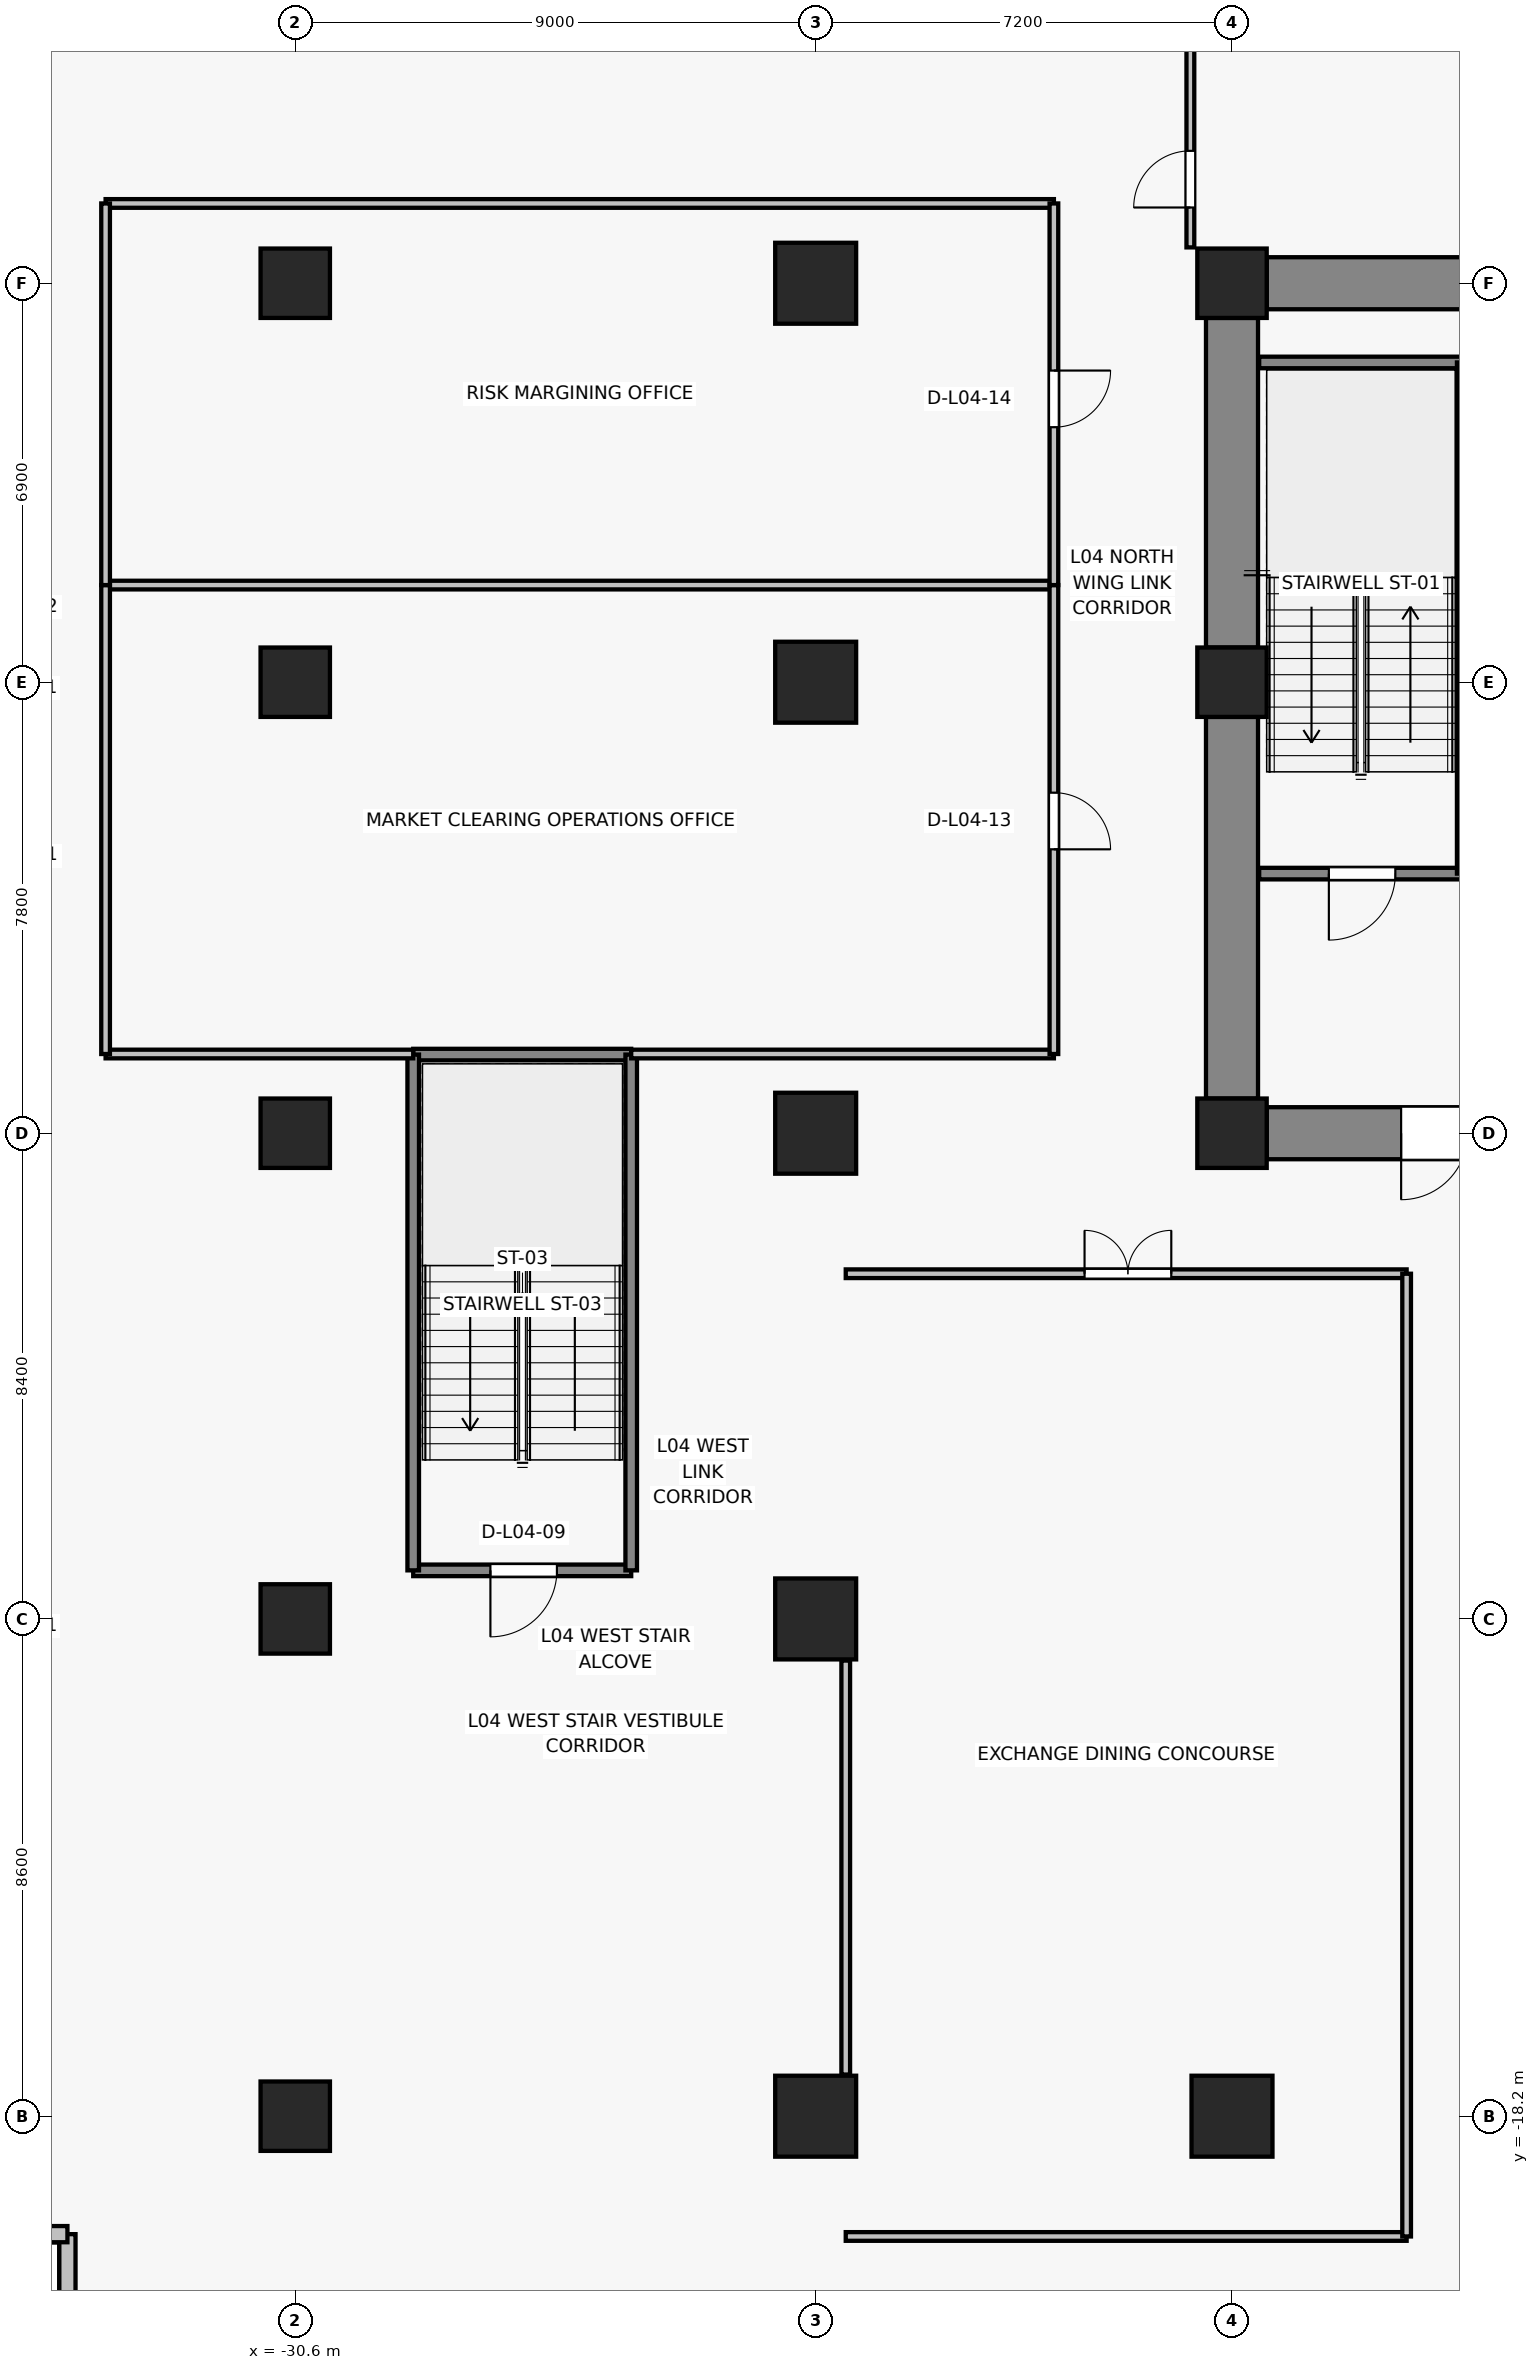
"""IFC4 building model, lengths in metres.
Left out: names, types, materials, properties, quantities, classifications, styles, units other than length and angle.
Written with IfcOpenShell. Run it as: python <this file> out.ifc"""

import sys

from ifc_helpers import new_model, si_unit, direction, frame, frame_2d, origin, origin_2d, place, context, subcontext, project, spatial, rectangle, extrude, source, transform, mapped, element, fill, save


model = new_model("IFC4")
c1 = context("Model", 3, precision=1e-05, world=origin(), true_north=direction((0.0, 1.0)))
c2 = subcontext(c1, "Body", "Model", "MODEL_VIEW")
j1 = project(units=[si_unit("LENGTHUNIT", "METRE"), si_unit("PLANEANGLEUNIT", "RADIAN")], contexts=[c1])
p1 = place(None, origin())
s1 = spatial("IfcSite", under=j1, at=p1, CompositionType="ELEMENT")
p2 = place(p1, origin())
s2 = spatial("IfcBuilding", under=s1, at=p2, CompositionType="ELEMENT")
p3 = place(p2, frame((0.0, 0.0, 18.2)))
s3 = spatial("IfcBuildingStorey", under=s2, at=p3, CompositionType="ELEMENT", Elevation=18.2)
for number, where, z_axis, x_axis in (
    (1, (-14.4, -1.2, 0.0), (0.0, 0.0, 1.0), (1.0, 0.0, 0.0)),
    (2, (-14.4, 6.6, 0.0), (0.0, 0.0, 1.0), (1.0, 0.0, 0.0)),
    (3, (-14.4, 13.5, 0.0), (0.0, 0.0, 1.0), (1.0, 0.0, 0.0)),
):
    element("IfcColumn", number, at=place(p3, frame(where, z_axis=z_axis, x_axis=x_axis)), inside=s3, PredefinedType="COLUMN", context=c2, shape_type="SweptSolid", body=[
        extrude(rectangle(XDim=1.2, YDim=1.2, at=origin_2d()), origin(), (0.0, 0.0, 1.0), 4.4),
    ])
for number, where, z_axis, x_axis in (
    (4, (-21.6, -18.2, 0.0), (0.0, 0.0, 1.0), (1.0, 0.0, 0.0)),
    (5, (-14.4, -18.2, 0.0), (0.0, 0.0, 1.0), (1.0, 0.0, 0.0)),
    (6, (-21.6, -9.6, 0.0), (0.0, 0.0, 1.0), (1.0, 0.0, 0.0)),
    (7, (-21.6, -1.2, 0.0), (0.0, 0.0, 1.0), (1.0, 0.0, 0.0)),
    (8, (-21.6, 6.6, 0.0), (0.0, 0.0, 1.0), (1.0, 0.0, 0.0)),
    (9, (-21.6, 13.5, 0.0), (0.0, 0.0, 1.0), (1.0, 0.0, 0.0)),
):
    element("IfcColumn", number, at=place(p3, frame(where, z_axis=z_axis, x_axis=x_axis)), inside=s3, PredefinedType="COLUMN", context=c2, shape_type="SweptSolid", body=[
        extrude(rectangle(XDim=1.4, YDim=1.4, at=origin_2d()), origin(), (0.0, 0.0, 1.0), 4.4),
    ])
for number, where, z_axis, x_axis in (
    (10, (-30.6, -18.2, 0.0), (0.0, 0.0, 1.0), (1.0, 0.0, 0.0)),
    (11, (-30.6, -9.6, 0.0), (0.0, 0.0, 1.0), (1.0, 0.0, 0.0)),
    (12, (-30.6, -1.2, 0.0), (0.0, 0.0, 1.0), (1.0, 0.0, 0.0)),
    (13, (-30.6, 6.6, 0.0), (0.0, 0.0, 1.0), (1.0, 0.0, 0.0)),
    (14, (-30.6, 13.5, 0.0), (0.0, 0.0, 1.0), (1.0, 0.0, 0.0)),
):
    element("IfcColumn", number, at=place(p3, frame(where, z_axis=z_axis, x_axis=x_axis)), inside=s3, PredefinedType="COLUMN", context=c2, shape_type="SweptSolid", body=[
        extrude(rectangle(XDim=1.2, YDim=1.2, at=origin_2d()), origin(), (0.0, 0.0, 1.0), 4.4),
    ])
p4 = place(p3, frame((-13.8, 13.5, 0.0), z_axis=(0.0, 0.0, 1.0), x_axis=(1.0, 0.0, 0.0)))
e15 = element("IfcWall", 15, at=p4, inside=s3, PredefinedType="SHEAR", context=c2, shape_type="SweptSolid", body=[
    extrude(rectangle(XDim=6.0, YDim=0.9, at=frame_2d((3.0, 0.0))), origin(), (0.0, 0.0, 1.0), 4.1),
])
p5 = place(p3, frame((-14.4, -0.6, 0.0), z_axis=(0.0, 0.0, 1.0), x_axis=(0.0, 1.0, 0.0)))
e16 = element("IfcWall", 16, at=p5, inside=s3, PredefinedType="SHEAR", context=c2, shape_type="SweptSolid", body=[
    extrude(rectangle(XDim=6.6, YDim=0.9, at=frame_2d((3.3, 0.0))), origin(), (0.0, 0.0, 1.0), 4.1),
])
p6 = place(p3, frame((-14.4, 7.2, 0.0), z_axis=(0.0, 0.0, 1.0), x_axis=(0.0, 1.0, 0.0)))
e17 = element("IfcWall", 17, at=p6, inside=s3, PredefinedType="SHEAR", context=c2, shape_type="SweptSolid", body=[
    extrude(rectangle(XDim=5.7, YDim=0.9, at=frame_2d((2.85, 0.0))), origin(), (0.0, 0.0, 1.0), 4.1),
])
p7 = place(p3, frame((-7.8, -1.2, 0.0), z_axis=(0.0, 0.0, 1.0), x_axis=(-1.0, 0.0, 0.0)))
e18 = element("IfcWall", 18, at=p7, inside=s3, PredefinedType="SHEAR", context=c2, shape_type="SweptSolid", body=[
    extrude(rectangle(XDim=6.0, YDim=0.9, at=frame_2d((3.0, 0.0))), origin(), (0.0, 0.0, 1.0), 4.1),
])
p8 = place(p7, frame((2.525, 0.0, 0.0)))
e19 = element("IfcOpeningElement", 19, at=p8, cuts=e18, PredefinedType="OPENING", context=c2, shape_type="SweptSolid", body=[
    extrude(rectangle(XDim=1.15, YDim=2.15, at=frame_2d((0.575, 1.075))), frame((0.0, 0.46, 0.0), z_axis=(0.0, -1.0, 0.0), x_axis=(1.0, 0.0, 0.0)), (0.0, 0.0, 1.0), 0.92),
])
for number, where, z_axis, x_axis in (
    (20, (-34.54, -20.24, 0.0), (0.0, 0.0, 1.0), (0.0, -1.0, 0.0)),
    (21, (-36.04, -20.24, 0.0), (0.0, 0.0, 1.0), (1.0, 0.0, 0.0)),
):
    element("IfcWall", number, at=place(p3, frame(where, z_axis=z_axis, x_axis=x_axis)), inside=s3, PredefinedType="SOLIDWALL", context=c2, shape_type="SweptSolid", body=[
        extrude(rectangle(XDim=1.5, YDim=0.28, at=frame_2d((0.75, 0.0))), origin(), (0.0, 0.0, 1.0), 4.1),
    ])
p9 = place(p3, frame((-10.41, 3.29, 0.0), z_axis=(0.0, 0.0, 1.0), x_axis=(-1.0, 0.0, 0.0)))
e22 = element("IfcWall", 22, at=p9, inside=s3, PredefinedType="SOLIDWALL", context=c2, shape_type="SweptSolid", body=[
    extrude(rectangle(XDim=3.52, YDim=0.2, at=frame_2d((1.76, 0.0))), origin(), (0.0, 0.0, 1.0), 4.1),
])
p10 = place(p9, frame((1.165, 0.0, 0.0)))
e23 = element("IfcOpeningElement", 23, at=p10, cuts=e22, PredefinedType="OPENING", context=c2, shape_type="SweptSolid", body=[
    extrude(rectangle(XDim=1.15, YDim=2.15, at=frame_2d((0.575, 1.075))), frame((0.0, 0.11, 0.0), z_axis=(0.0, -1.0, 0.0), x_axis=(1.0, 0.0, 0.0)), (0.0, 0.0, 1.0), 0.22),
])
p11 = place(p3, frame((-13.93, 12.13, 0.0), z_axis=(0.0, 0.0, 1.0), x_axis=(1.0, 0.0, 0.0)))
e24 = element("IfcWall", 24, at=p11, inside=s3, PredefinedType="SOLIDWALL", context=c2, shape_type="SweptSolid", body=[
    extrude(rectangle(XDim=3.52, YDim=0.2, at=frame_2d((1.76, 0.0))), origin(), (0.0, 0.0, 1.0), 4.1),
])
p12 = place(p3, frame((-10.41, 12.13, 0.0), z_axis=(0.0, 0.0, 1.0), x_axis=(0.0, -1.0, 0.0)))
e25 = element("IfcWall", 25, at=p12, inside=s3, PredefinedType="SOLIDWALL", context=c2, shape_type="SweptSolid", body=[
    extrude(rectangle(XDim=8.84, YDim=0.2, at=frame_2d((4.42, 0.0))), origin(), (0.0, 0.0, 1.0), 4.1),
])
p13 = place(p3, frame((-24.79, -8.76, 0.0), z_axis=(0.0, 0.0, 1.0), x_axis=(-1.0, 0.0, 0.0)))
e26 = element("IfcWall", 26, at=p13, inside=s3, PredefinedType="SOLIDWALL", context=c2, shape_type="SweptSolid", body=[
    extrude(rectangle(XDim=3.77, YDim=0.2, at=frame_2d((1.885, 0.0))), origin(), (0.0, 0.0, 1.0), 4.1),
])
p14 = place(p13, frame((1.285, 0.0, 0.0)))
e27 = element("IfcOpeningElement", 27, at=p14, cuts=e26, PredefinedType="OPENING", context=c2, shape_type="SweptSolid", body=[
    extrude(rectangle(XDim=1.15, YDim=2.15, at=frame_2d((0.575, 1.075))), frame((0.0, 0.11, 0.0), z_axis=(0.0, -1.0, 0.0), x_axis=(1.0, 0.0, 0.0)), (0.0, 0.0, 1.0), 0.22),
])
p15 = place(p3, frame((-28.56, 0.16, 0.0), z_axis=(0.0, 0.0, 1.0), x_axis=(1.0, 0.0, 0.0)))
e28 = element("IfcWall", 28, at=p15, inside=s3, PredefinedType="SOLIDWALL", context=c2, shape_type="SweptSolid", body=[
    extrude(rectangle(XDim=3.77, YDim=0.2, at=frame_2d((1.885, 0.0))), origin(), (0.0, 0.0, 1.0), 4.1),
])
for number, where, z_axis, x_axis in (
    (29, (-28.56, -8.76, 0.0), (0.0, 0.0, 1.0), (0.0, 1.0, 0.0)),
    (30, (-24.79, 0.16, 0.0), (0.0, 0.0, 1.0), (0.0, -1.0, 0.0)),
):
    element("IfcWall", number, at=place(p3, frame(where, z_axis=z_axis, x_axis=x_axis)), inside=s3, PredefinedType="SOLIDWALL", context=c2, shape_type="SweptSolid", body=[
        extrude(rectangle(XDim=8.92, YDim=0.2, at=frame_2d((4.46, 0.0))), origin(), (0.0, 0.0, 1.0), 4.1),
    ])
p16 = place(p3, frame((-11.38, -20.28, 0.0), z_axis=(0.0, 0.0, 1.0), x_axis=(-1.0, 0.0, 0.0)))
e31 = element("IfcWall", 31, at=p16, inside=s3, PredefinedType="PARTITIONING", context=c2, shape_type="SweptSolid", body=[
    extrude(rectangle(XDim=9.7, YDim=0.15, at=frame_2d((4.85, 0.0))), origin(), (0.0, 0.0, 1.0), 4.1),
])
p17 = place(p3, frame((-21.08, -3.63, 0.0), z_axis=(0.0, 0.0, 1.0), x_axis=(1.0, 0.0, 0.0)))
e32 = element("IfcWall", 32, at=p17, inside=s3, PredefinedType="PARTITIONING", context=c2, shape_type="SweptSolid", body=[
    extrude(rectangle(XDim=9.7, YDim=0.15, at=frame_2d((4.85, 0.0))), origin(), (0.0, 0.0, 1.0), 3.239),
])
p18 = place(p17, frame((4.13, 0.0, 0.0)))
e33 = element("IfcOpeningElement", 33, at=p18, cuts=e32, PredefinedType="OPENING", context=c2, shape_type="SweptSolid", body=[
    extrude(rectangle(XDim=1.5, YDim=2.2, at=frame_2d((0.75, 1.1))), frame((0.0, 0.085, 0.0), z_axis=(0.0, -1.0, 0.0), x_axis=(1.0, 0.0, 0.0)), (0.0, 0.0, 1.0), 0.17),
])
p19 = place(p3, frame((-21.08, -17.48, 0.0), z_axis=(0.0, 0.0, 1.0), x_axis=(0.0, 1.0, 0.0)))
e34 = element("IfcWall", 34, at=p19, inside=s3, PredefinedType="PARTITIONING", context=c2, shape_type="SweptSolid", body=[
    extrude(rectangle(XDim=7.16, YDim=0.15, at=frame_2d((3.58, 0.0))), origin(), (0.0, 0.0, 1.0), 3.29),
])
p20 = place(p3, frame((-11.38, -3.63, 0.0), z_axis=(0.0, 0.0, 1.0), x_axis=(0.0, -1.0, 0.0)))
e35 = element("IfcWall", 35, at=p20, inside=s3, PredefinedType="PARTITIONING", context=c2, shape_type="SweptSolid", body=[
    extrude(rectangle(XDim=16.65, YDim=0.15, at=frame_2d((8.325, 0.0))), origin(), (0.0, 0.0, 1.0), 3.19),
])
p21 = place(p3, frame((-28.56, 0.17, 0.0), z_axis=(0.0, 0.0, 1.0), x_axis=(-1.0, 0.0, 0.0)))
e36 = element("IfcWall", 36, at=p21, inside=s3, PredefinedType="PARTITIONING", context=c2, shape_type="SweptSolid", body=[
    extrude(rectangle(XDim=5.32, YDim=0.15, at=frame_2d((2.66, 0.0))), origin(), (0.0, 0.0, 1.0), 3.19),
])
p22 = place(p3, frame((-17.48, 0.17, 0.0), z_axis=(0.0, 0.0, 1.0), x_axis=(-1.0, 0.0, 0.0)))
e37 = element("IfcWall", 37, at=p22, inside=s3, PredefinedType="PARTITIONING", context=c2, shape_type="SweptSolid", body=[
    extrude(rectangle(XDim=7.31, YDim=0.15, at=frame_2d((3.655, 0.0))), origin(), (0.0, 0.0, 1.0), 3.19),
])
p23 = place(p3, frame((-33.88, 8.28, 0.0), z_axis=(0.0, 0.0, 1.0), x_axis=(1.0, 0.0, 0.0)))
e38 = element("IfcWall", 38, at=p23, inside=s3, PredefinedType="PARTITIONING", context=c2, shape_type="SweptSolid", body=[
    extrude(rectangle(XDim=16.4, YDim=0.15, at=frame_2d((8.2, 0.0))), origin(), (0.0, 0.0, 1.0), 3.19),
])
p24 = place(p3, frame((-33.88, 0.17, 0.0), z_axis=(0.0, 0.0, 1.0), x_axis=(0.0, 1.0, 0.0)))
e39 = element("IfcWall", 39, at=p24, inside=s3, PredefinedType="PARTITIONING", context=c2, shape_type="SweptSolid", body=[
    extrude(rectangle(XDim=8.11, YDim=0.15, at=frame_2d((4.055, 0.0))), origin(), (0.0, 0.0, 1.0), 4.1),
])
p25 = place(p3, frame((-17.48, 8.28, 0.0), z_axis=(0.0, 0.0, 1.0), x_axis=(0.0, -1.0, 0.0)))
e40 = element("IfcWall", 40, at=p25, inside=s3, PredefinedType="PARTITIONING", context=c2, shape_type="SweptSolid", body=[
    extrude(rectangle(XDim=8.11, YDim=0.15, at=frame_2d((4.055, 0.0))), origin(), (0.0, 0.0, 1.0), 3.19),
])
p26 = place(p25, frame((3.59, 0.0, 0.0)))
e41 = element("IfcOpeningElement", 41, at=p26, cuts=e40, PredefinedType="OPENING", context=c2, shape_type="SweptSolid", body=[
    extrude(rectangle(XDim=0.98, YDim=2.15, at=frame_2d((0.49, 1.075))), frame((0.0, 0.085, 0.0), z_axis=(0.0, -1.0, 0.0), x_axis=(1.0, 0.0, 0.0)), (0.0, 0.0, 1.0), 0.17),
])
p27 = place(p3, frame((-33.88, 14.88, 0.0), z_axis=(0.0, 0.0, 1.0), x_axis=(1.0, 0.0, 0.0)))
e42 = element("IfcWall", 42, at=p27, inside=s3, PredefinedType="PARTITIONING", context=c2, shape_type="SweptSolid", body=[
    extrude(rectangle(XDim=16.4, YDim=0.15, at=frame_2d((8.2, 0.0))), origin(), (0.0, 0.0, 1.0), 3.19),
])
p28 = place(p3, frame((-33.88, 8.28, 0.0), z_axis=(0.0, 0.0, 1.0), x_axis=(0.0, 1.0, 0.0)))
e43 = element("IfcWall", 43, at=p28, inside=s3, PredefinedType="PARTITIONING", context=c2, shape_type="SweptSolid", body=[
    extrude(rectangle(XDim=6.6, YDim=0.15, at=frame_2d((3.3, 0.0))), origin(), (0.0, 0.0, 1.0), 4.1),
])
p29 = place(p3, frame((-17.48, 14.88, 0.0), z_axis=(0.0, 0.0, 1.0), x_axis=(0.0, -1.0, 0.0)))
e44 = element("IfcWall", 44, at=p29, inside=s3, PredefinedType="PARTITIONING", context=c2, shape_type="SweptSolid", body=[
    extrude(rectangle(XDim=6.6, YDim=0.15, at=frame_2d((3.3, 0.0))), origin(), (0.0, 0.0, 1.0), 3.19),
])
p30 = place(p29, frame((2.89, 0.0, 0.0)))
e45 = element("IfcOpeningElement", 45, at=p30, cuts=e44, PredefinedType="OPENING", context=c2, shape_type="SweptSolid", body=[
    extrude(rectangle(XDim=0.98, YDim=2.15, at=frame_2d((0.49, 1.075))), frame((0.0, 0.085, 0.0), z_axis=(0.0, -1.0, 0.0), x_axis=(1.0, 0.0, 0.0)), (0.0, 0.0, 1.0), 0.17),
])
p31 = place(p3, frame((-15.12, 14.12, 0.0), z_axis=(0.0, 0.0, 1.0), x_axis=(0.0, 1.0, 0.0)))
e46 = element("IfcWall", 46, at=p31, inside=s3, PredefinedType="PARTITIONING", context=c2, shape_type="SweptSolid", body=[
    extrude(rectangle(XDim=6.96, YDim=0.135, at=frame_2d((3.48, 0.0))), origin(), (0.0, 0.0, 1.0), 3.473),
])
p32 = place(p31, frame((0.69, 0.0, 0.0)))
e47 = element("IfcOpeningElement", 47, at=p32, cuts=e46, PredefinedType="OPENING", context=c2, shape_type="SweptSolid", body=[
    extrude(rectangle(XDim=0.98, YDim=2.15, at=frame_2d((0.49, 1.075))), frame((0.0, 0.077, 0.0), z_axis=(0.0, -1.0, 0.0), x_axis=(1.0, 0.0, 0.0)), (0.0, 0.0, 1.0), 0.155),
])
m1 = source(origin(), c2, "Body", "SweptSolid", [
    extrude(rectangle(XDim=1.15, YDim=2.15, at=frame_2d((0.575, 1.075))), frame((0.0, 0.025, 0.0), z_axis=(0.0, -1.0, 0.0), x_axis=(1.0, 0.0, 0.0)), (0.0, 0.0, 1.0), 0.05),
])
p33 = place(p10, origin())
e48 = element("IfcDoor", 48, at=p33, inside=s3, OperationType="SINGLE_SWING_RIGHT", PredefinedType="DOOR", context=c2, shape_type="MappedRepresentation", body=[
    mapped(m1, transform((0.0, 0.0, 0.0), x_axis=(1.0, 0.0, 0.0), y_axis=(0.0, 1.0, 0.0), z_axis=(0.0, 0.0, 1.0), scale=1.0)),
])
fill(e23, e48)
p34 = place(p8, origin())
e49 = element("IfcDoor", 49, at=p34, inside=s3, OperationType="SINGLE_SWING_RIGHT", PredefinedType="DOOR", context=c2, shape_type="MappedRepresentation", body=[
    mapped(m1, transform((0.0, 0.0, 0.0), x_axis=(1.0, 0.0, 0.0), y_axis=(0.0, 1.0, 0.0), z_axis=(0.0, 0.0, 1.0), scale=1.0)),
])
fill(e19, e49)
p35 = place(p14, origin())
e50 = element("IfcDoor", 50, at=p35, inside=s3, OperationType="SINGLE_SWING_RIGHT", PredefinedType="DOOR", context=c2, shape_type="MappedRepresentation", body=[
    mapped(m1, transform((0.0, 0.0, 0.0), x_axis=(1.0, 0.0, 0.0), y_axis=(0.0, 1.0, 0.0), z_axis=(0.0, 0.0, 1.0), scale=1.0)),
])
fill(e27, e50)
m2 = source(origin(), c2, "Body", "SweptSolid", [
    extrude(rectangle(XDim=1.5, YDim=2.2, at=frame_2d((0.75, 1.1))), frame((0.0, 0.025, 0.0), z_axis=(0.0, -1.0, 0.0), x_axis=(1.0, 0.0, 0.0)), (0.0, 0.0, 1.0), 0.05),
])
p36 = place(p18, origin())
e51 = element("IfcDoor", 51, at=p36, inside=s3, OperationType="DOUBLE_DOOR_SINGLE_SWING", PredefinedType="DOOR", context=c2, shape_type="MappedRepresentation", body=[
    mapped(m2, transform((0.0, 0.0, 0.0), x_axis=(1.0, 0.0, 0.0), y_axis=(0.0, 1.0, 0.0), z_axis=(0.0, 0.0, 1.0), scale=1.0)),
])
fill(e33, e51)
m3 = source(origin(), c2, "Body", "SweptSolid", [
    extrude(rectangle(XDim=0.98, YDim=2.15, at=frame_2d((0.49, 1.075))), frame((0.0, 0.025, 0.0), z_axis=(0.0, -1.0, 0.0), x_axis=(1.0, 0.0, 0.0)), (0.0, 0.0, 1.0), 0.05),
])
p37 = place(p26, origin())
e52 = element("IfcDoor", 52, at=p37, inside=s3, OperationType="SINGLE_SWING_RIGHT", PredefinedType="DOOR", context=c2, shape_type="MappedRepresentation", body=[
    mapped(m3, transform((0.0, 0.0, 0.0), x_axis=(1.0, 0.0, 0.0), y_axis=(0.0, 1.0, 0.0), z_axis=(0.0, 0.0, 1.0), scale=1.0)),
])
fill(e41, e52)
p38 = place(p30, origin())
e53 = element("IfcDoor", 53, at=p38, inside=s3, OperationType="SINGLE_SWING_LEFT", PredefinedType="DOOR", context=c2, shape_type="MappedRepresentation", body=[
    mapped(m3, transform((0.0, 0.0, 0.0), x_axis=(1.0, 0.0, 0.0), y_axis=(0.0, 1.0, 0.0), z_axis=(0.0, 0.0, 1.0), scale=1.0)),
])
fill(e45, e53)
p39 = place(p32, origin())
e54 = element("IfcDoor", 54, at=p39, inside=s3, OperationType="SINGLE_SWING_LEFT", PredefinedType="DOOR", context=c2, shape_type="MappedRepresentation", body=[
    mapped(m3, transform((0.0, 0.0, 0.0), x_axis=(1.0, 0.0, 0.0), y_axis=(0.0, 1.0, 0.0), z_axis=(0.0, 0.0, 1.0), scale=1.0)),
])
fill(e47, e54)
save(model, sys.argv[1])
